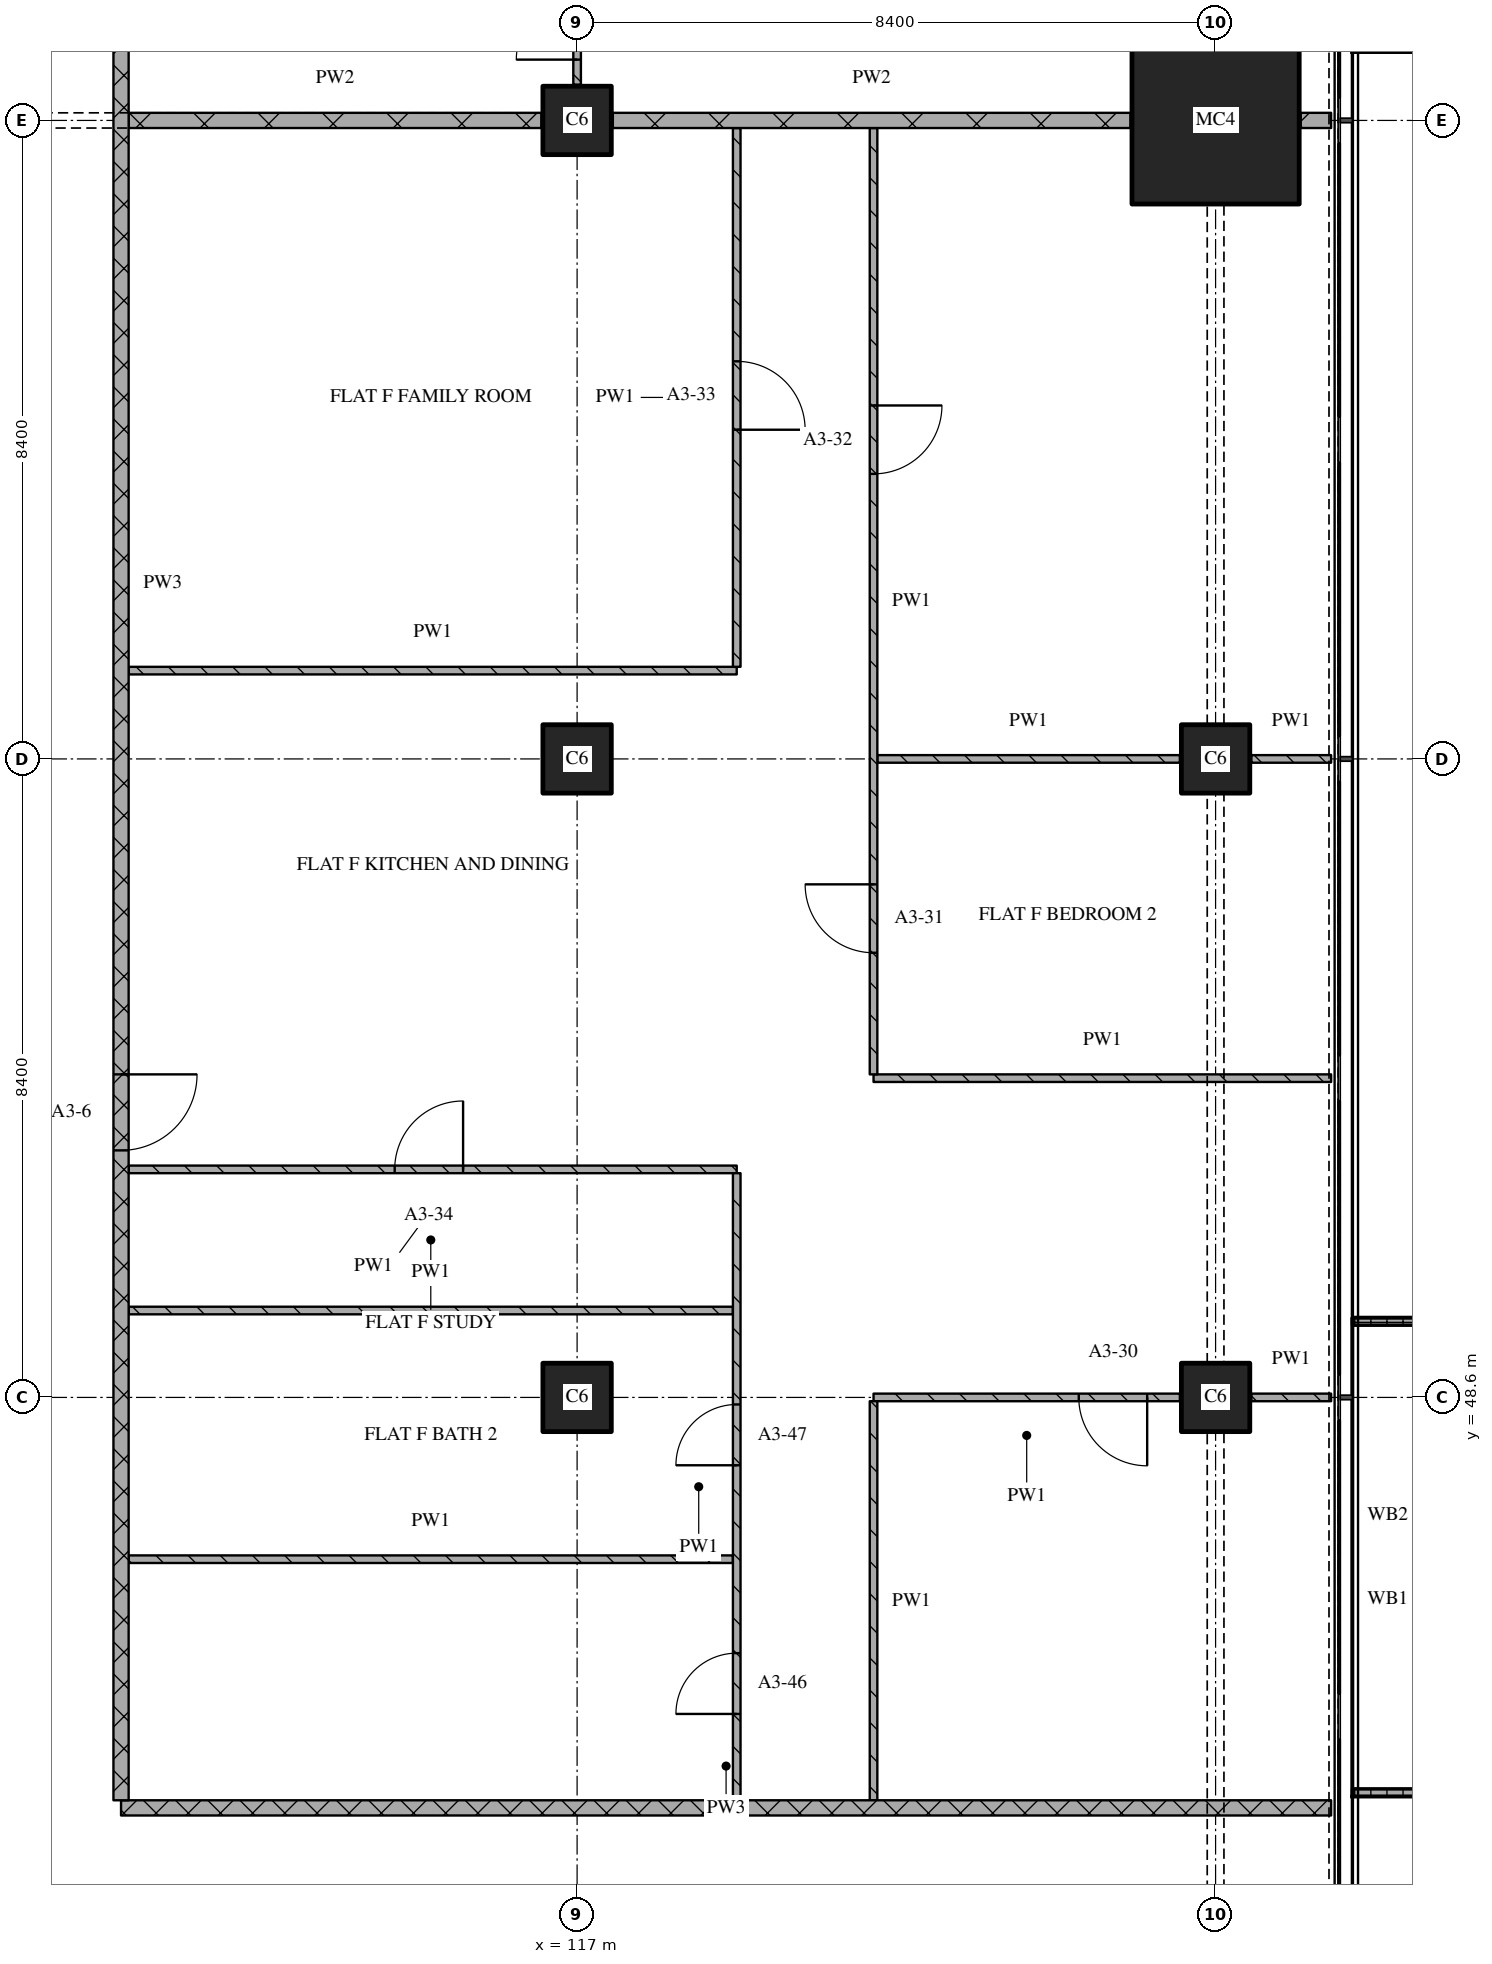
"""IFC4 building model, lengths in metres.
Left out: names, types, materials, properties, quantities, classifications, styles, units other than length and angle.
Written with IfcOpenShell. Run it as: python <this file> out.ifc"""

import sys

from ifc_helpers import new_model, si_unit, direction, frame, frame_2d, origin, origin_2d, place, context, subcontext, project, spatial, polyline, rectangle, outline, extrude, element, fill, save


model = new_model("IFC4")
c1 = context("Model", 3, precision=1e-05, world=origin(), true_north=direction((0.0, 1.0)))
c2 = subcontext(c1, "Body", "Model", "MODEL_VIEW")
j1 = project(units=[si_unit("LENGTHUNIT", "METRE"), si_unit("PLANEANGLEUNIT", "RADIAN")], contexts=[c1])
p1 = place(None, origin())
s1 = spatial("IfcSite", under=j1, at=p1, CompositionType="ELEMENT")
p2 = place(p1, origin())
s2 = spatial("IfcBuilding", under=s1, at=p2, CompositionType="ELEMENT")
p3 = place(p2, frame((0.0, 0.0, 66.0)))
s3 = spatial("IfcBuildingStorey", under=s2, at=p3, CompositionType="ELEMENT", Elevation=66.0)
for number, where, z_axis, x_axis in (
    (1, (117.0, 48.6, 0.0), (0.0, 0.0, 1.0), (1.0, 0.0, 0.0)),
    (2, (117.0, 57.0, 0.0), (0.0, 0.0, 1.0), (1.0, 0.0, 0.0)),
    (3, (117.0, 65.4, 0.0), (0.0, 0.0, 1.0), (1.0, 0.0, 0.0)),
    (4, (125.4, 48.6, 0.0), (0.0, 0.0, 1.0), (1.0, 0.0, 0.0)),
    (5, (125.4, 57.0, 0.0), (0.0, 0.0, 1.0), (1.0, 0.0, 0.0)),
):
    element("IfcColumn", number, at=place(p3, frame(where, z_axis=z_axis, x_axis=x_axis)), inside=s3, PredefinedType="COLUMN", context=c2, shape_type="SweptSolid", body=[
        extrude(rectangle(XDim=0.9, YDim=0.9, at=origin_2d()), origin(), (0.0, 0.0, 1.0), 3.6),
    ])
p4 = place(p3, frame((125.4, 65.4, 0.0), z_axis=(0.0, 0.0, 1.0), x_axis=(1.0, 0.0, 0.0)))
e6 = element("IfcColumn", 6, at=p4, inside=s3, PredefinedType="COLUMN", context=c2, shape_type="SweptSolid", body=[
    extrude(rectangle(XDim=2.2, YDim=2.2, at=origin_2d()), origin(), (0.0, 0.0, 1.0), 3.6),
])
p5 = place(p3, origin())
e7 = element("IfcWall", 7, at=p5, inside=s3, PredefinedType="SOLIDWALL", context=c2, shape_type="SweptSolid", body=[
    extrude(outline(polyline([(127.2, 43.35), (127.2, 43.45), (128.967, 43.45), (128.967, 49.55), (127.2, 49.55), (127.2, 49.65), (129.067, 49.65), (129.067, 43.35), (127.2, 43.35)])), origin(), (0.0, 0.0, 1.0), 1.0),
])
p6 = place(p3, frame((111.0, 43.2, 0.0), z_axis=(0.0, 0.0, 1.0), x_axis=(1.0, 0.0, 0.0)))
e8 = element("IfcWall", 8, at=p6, inside=s3, PredefinedType="PARTITIONING", context=c2, shape_type="SweptSolid", body=[
    extrude(rectangle(XDim=15.92, YDim=0.2, at=frame_2d((7.96, 0.0))), origin(), (0.0, 0.0, 1.0), 3.32),
])
p7 = place(p3, frame((111.1, 46.472, 0.0), z_axis=(0.0, 0.0, 1.0), x_axis=(1.0, 0.0, 0.0)))
e9 = element("IfcWall", 9, at=p7, inside=s3, PredefinedType="PARTITIONING", context=c2, shape_type="SweptSolid", body=[
    extrude(rectangle(XDim=7.95, YDim=0.1, at=frame_2d((3.975, 0.0))), origin(), (0.0, 0.0, 1.0), 3.32),
])
p8 = place(p3, frame((124.93, 48.6, 0.0), z_axis=(0.0, 0.0, 1.0), x_axis=(-1.0, 0.0, 0.0)))
e10 = element("IfcWall", 10, at=p8, inside=s3, PredefinedType="PARTITIONING", context=c2, shape_type="SweptSolid", body=[
    extrude(rectangle(XDim=4.03, YDim=0.1, at=frame_2d((2.015, 0.0))), origin(), (0.0, 0.0, 1.0), 3.32),
])
p9 = place(p8, frame((0.43, 0.0, 0.0)))
e11 = element("IfcOpeningElement", 11, at=p9, cuts=e10, PredefinedType="OPENING", context=c2, shape_type="SweptSolid", body=[
    extrude(rectangle(XDim=0.9, YDim=2.1, at=frame_2d((0.45, 1.05))), frame((0.0, 0.06, 0.0), z_axis=(0.0, -1.0, 0.0), x_axis=(1.0, 0.0, 0.0)), (0.0, 0.0, 1.0), 0.12),
])
p10 = place(p3, frame((125.87, 48.6, 0.0), z_axis=(0.0, 0.0, 1.0), x_axis=(1.0, 0.0, 0.0)))
e12 = element("IfcWall", 12, at=p10, inside=s3, PredefinedType="PARTITIONING", context=c2, shape_type="SweptSolid", body=[
    extrude(rectangle(XDim=1.05, YDim=0.1, at=frame_2d((0.525, 0.0))), origin(), (0.0, 0.0, 1.0), 3.32),
])
p11 = place(p3, frame((111.1, 49.743, 0.0), z_axis=(0.0, 0.0, 1.0), x_axis=(1.0, 0.0, 0.0)))
e13 = element("IfcWall", 13, at=p11, inside=s3, PredefinedType="PARTITIONING", context=c2, shape_type="SweptSolid", body=[
    extrude(rectangle(XDim=7.95, YDim=0.1, at=frame_2d((3.975, 0.0))), origin(), (0.0, 0.0, 1.0), 3.32),
])
p12 = place(p3, frame((119.1, 51.6, 0.0), z_axis=(0.0, 0.0, 1.0), x_axis=(-1.0, 0.0, 0.0)))
e14 = element("IfcWall", 14, at=p12, inside=s3, PredefinedType="PARTITIONING", context=c2, shape_type="SweptSolid", body=[
    extrude(rectangle(XDim=8.0, YDim=0.1, at=frame_2d((4.0, 0.0))), origin(), (0.0, 0.0, 1.0), 3.32),
])
p13 = place(p12, frame((3.6, 0.0, 0.0)))
e15 = element("IfcOpeningElement", 15, at=p13, cuts=e14, PredefinedType="OPENING", context=c2, shape_type="SweptSolid", body=[
    extrude(rectangle(XDim=0.9, YDim=2.1, at=frame_2d((0.45, 1.05))), frame((0.0, 0.06, 0.0), z_axis=(0.0, -1.0, 0.0), x_axis=(1.0, 0.0, 0.0)), (0.0, 0.0, 1.0), 0.12),
])
p14 = place(p3, frame((120.9, 52.8, 0.0), z_axis=(0.0, 0.0, 1.0), x_axis=(1.0, 0.0, 0.0)))
e16 = element("IfcWall", 16, at=p14, inside=s3, PredefinedType="PARTITIONING", context=c2, shape_type="SweptSolid", body=[
    extrude(rectangle(XDim=6.02, YDim=0.1, at=frame_2d((3.01, 0.0))), origin(), (0.0, 0.0, 1.0), 3.32),
])
p15 = place(p3, frame((120.95, 57.0, 0.0), z_axis=(0.0, 0.0, 1.0), x_axis=(1.0, 0.0, 0.0)))
e17 = element("IfcWall", 17, at=p15, inside=s3, PredefinedType="PARTITIONING", context=c2, shape_type="SweptSolid", body=[
    extrude(rectangle(XDim=3.98, YDim=0.1, at=frame_2d((1.99, 0.0))), origin(), (0.0, 0.0, 1.0), 3.32),
])
p16 = place(p3, frame((125.87, 57.0, 0.0), z_axis=(0.0, 0.0, 1.0), x_axis=(1.0, 0.0, 0.0)))
e18 = element("IfcWall", 18, at=p16, inside=s3, PredefinedType="PARTITIONING", context=c2, shape_type="SweptSolid", body=[
    extrude(rectangle(XDim=1.05, YDim=0.1, at=frame_2d((0.525, 0.0))), origin(), (0.0, 0.0, 1.0), 3.32),
])
p17 = place(p3, frame((111.1, 58.162, 0.0), z_axis=(0.0, 0.0, 1.0), x_axis=(1.0, 0.0, 0.0)))
e19 = element("IfcWall", 19, at=p17, inside=s3, PredefinedType="PARTITIONING", context=c2, shape_type="SweptSolid", body=[
    extrude(rectangle(XDim=8.0, YDim=0.1, at=frame_2d((4.0, 0.0))), origin(), (0.0, 0.0, 1.0), 3.32),
])
p18 = place(p3, frame((111.1, 65.4, 0.0), z_axis=(0.0, 0.0, 1.0), x_axis=(1.0, 0.0, 0.0)))
e20 = element("IfcWall", 20, at=p18, inside=s3, PredefinedType="PARTITIONING", context=c2, shape_type="SweptSolid", body=[
    extrude(rectangle(XDim=5.43, YDim=0.2, at=frame_2d((2.715, 0.0))), origin(), (0.0, 0.0, 1.0), 2.82),
])
p19 = place(p3, frame((117.47, 65.4, 0.0), z_axis=(0.0, 0.0, 1.0), x_axis=(1.0, 0.0, 0.0)))
e21 = element("IfcWall", 21, at=p19, inside=s3, PredefinedType="PARTITIONING", context=c2, shape_type="SweptSolid", body=[
    extrude(rectangle(XDim=6.81, YDim=0.2, at=frame_2d((3.405, 0.0))), origin(), (0.0, 0.0, 1.0), 3.32),
])
p20 = place(p3, frame((126.52, 65.4, 0.0), z_axis=(0.0, 0.0, 1.0), x_axis=(1.0, 0.0, 0.0)))
e22 = element("IfcWall", 22, at=p20, inside=s3, PredefinedType="PARTITIONING", context=c2, shape_type="SweptSolid", body=[
    extrude(rectangle(XDim=0.4, YDim=0.2, at=frame_2d((0.2, 0.0))), origin(), (0.0, 0.0, 1.0), 3.32),
])
p21 = place(p3, frame((111.0, 75.32, 0.0), z_axis=(0.0, 0.0, 1.0), x_axis=(0.0, -1.0, 0.0)))
e23 = element("IfcWall", 23, at=p21, inside=s3, PredefinedType="PARTITIONING", context=c2, shape_type="SweptSolid", body=[
    extrude(rectangle(XDim=32.02, YDim=0.2, at=frame_2d((16.01, 0.0))), origin(), (0.0, 0.0, 1.0), 3.32),
])
p22 = place(p21, frame((6.27, 0.0, 0.0)))
e24 = element("IfcOpeningElement", 24, at=p22, cuts=e23, PredefinedType="OPENING", context=c2, shape_type="SweptSolid", body=[
    extrude(rectangle(XDim=1.0, YDim=2.1, at=frame_2d((0.5, 1.05))), frame((0.0, 0.11, 0.0), z_axis=(0.0, -1.0, 0.0), x_axis=(1.0, 0.0, 0.0)), (0.0, 0.0, 1.0), 0.22),
])
p23 = place(p21, frame((22.47, 0.0, 0.0)))
e25 = element("IfcOpeningElement", 25, at=p23, cuts=e23, PredefinedType="OPENING", context=c2, shape_type="SweptSolid", body=[
    extrude(rectangle(XDim=1.0, YDim=2.1, at=frame_2d((0.5, 1.05))), frame((0.0, 0.11, 0.0), z_axis=(0.0, -1.0, 0.0), x_axis=(1.0, 0.0, 0.0)), (0.0, 0.0, 1.0), 0.22),
])
p24 = place(p3, frame((117.0, 65.87, 0.0), z_axis=(0.0, 0.0, 1.0), x_axis=(0.0, 1.0, 0.0)))
e26 = element("IfcWall", 26, at=p24, inside=s3, PredefinedType="PARTITIONING", context=c2, shape_type="SweptSolid", body=[
    extrude(rectangle(XDim=1.88, YDim=0.1, at=frame_2d((0.94, 0.0))), origin(), (0.0, 0.0, 1.0), 3.32),
])
p25 = place(p24, frame((0.33, 0.0, 0.0)))
e27 = element("IfcOpeningElement", 27, at=p25, cuts=e26, PredefinedType="OPENING", context=c2, shape_type="SweptSolid", body=[
    extrude(rectangle(XDim=0.8, YDim=2.1, at=frame_2d((0.4, 1.05))), frame((0.0, 0.06, 0.0), z_axis=(0.0, -1.0, 0.0), x_axis=(1.0, 0.0, 0.0)), (0.0, 0.0, 1.0), 0.12),
])
p26 = place(p3, frame((119.1, 43.3, 0.0), z_axis=(0.0, 0.0, 1.0), x_axis=(0.0, 1.0, 0.0)))
e28 = element("IfcWall", 28, at=p26, inside=s3, PredefinedType="PARTITIONING", context=c2, shape_type="SweptSolid", body=[
    extrude(rectangle(XDim=8.25, YDim=0.1, at=frame_2d((4.125, 0.0))), origin(), (0.0, 0.0, 1.0), 3.32),
])
p27 = place(p26, frame((1.136, 0.0, 0.0)))
e29 = element("IfcOpeningElement", 29, at=p27, cuts=e28, PredefinedType="OPENING", context=c2, shape_type="SweptSolid", body=[
    extrude(rectangle(XDim=0.8, YDim=2.1, at=frame_2d((0.4, 1.05))), frame((0.0, 0.06, 0.0), z_axis=(0.0, -1.0, 0.0), x_axis=(1.0, 0.0, 0.0)), (0.0, 0.0, 1.0), 0.12),
])
p28 = place(p26, frame((4.407, 0.0, 0.0)))
e30 = element("IfcOpeningElement", 30, at=p28, cuts=e28, PredefinedType="OPENING", context=c2, shape_type="SweptSolid", body=[
    extrude(rectangle(XDim=0.8, YDim=2.1, at=frame_2d((0.4, 1.05))), frame((0.0, 0.06, 0.0), z_axis=(0.0, -1.0, 0.0), x_axis=(1.0, 0.0, 0.0)), (0.0, 0.0, 1.0), 0.12),
])
p29 = place(p3, frame((119.1, 58.212, 0.0), z_axis=(0.0, 0.0, 1.0), x_axis=(0.0, 1.0, 0.0)))
e31 = element("IfcWall", 31, at=p29, inside=s3, PredefinedType="PARTITIONING", context=c2, shape_type="SweptSolid", body=[
    extrude(rectangle(XDim=7.088, YDim=0.1, at=frame_2d((3.544, 0.0))), origin(), (0.0, 0.0, 1.0), 3.32),
])
p30 = place(p29, frame((3.119, 0.0, 0.0)))
e32 = element("IfcOpeningElement", 32, at=p30, cuts=e31, PredefinedType="OPENING", context=c2, shape_type="SweptSolid", body=[
    extrude(rectangle(XDim=0.9, YDim=2.1, at=frame_2d((0.45, 1.05))), frame((0.0, 0.06, 0.0), z_axis=(0.0, -1.0, 0.0), x_axis=(1.0, 0.0, 0.0)), (0.0, 0.0, 1.0), 0.12),
])
p31 = place(p3, frame((120.9, 48.55, 0.0), z_axis=(0.0, 0.0, 1.0), x_axis=(0.0, -1.0, 0.0)))
e33 = element("IfcWall", 33, at=p31, inside=s3, PredefinedType="PARTITIONING", context=c2, shape_type="SweptSolid", body=[
    extrude(rectangle(XDim=5.25, YDim=0.1, at=frame_2d((2.625, 0.0))), origin(), (0.0, 0.0, 1.0), 3.32),
])
p32 = place(p3, frame((120.9, 65.3, 0.0), z_axis=(0.0, 0.0, 1.0), x_axis=(0.0, -1.0, 0.0)))
e34 = element("IfcWall", 34, at=p32, inside=s3, PredefinedType="PARTITIONING", context=c2, shape_type="SweptSolid", body=[
    extrude(rectangle(XDim=12.45, YDim=0.1, at=frame_2d((6.225, 0.0))), origin(), (0.0, 0.0, 1.0), 3.32),
])
p33 = place(p32, frame((3.65, 0.0, 0.0)))
e35 = element("IfcOpeningElement", 35, at=p33, cuts=e34, PredefinedType="OPENING", context=c2, shape_type="SweptSolid", body=[
    extrude(rectangle(XDim=0.9, YDim=2.1, at=frame_2d((0.45, 1.05))), frame((0.0, 0.06, 0.0), z_axis=(0.0, -1.0, 0.0), x_axis=(1.0, 0.0, 0.0)), (0.0, 0.0, 1.0), 0.12),
])
p34 = place(p32, frame((9.95, 0.0, 0.0)))
e36 = element("IfcOpeningElement", 36, at=p34, cuts=e34, PredefinedType="OPENING", context=c2, shape_type="SweptSolid", body=[
    extrude(rectangle(XDim=0.9, YDim=2.1, at=frame_2d((0.45, 1.05))), frame((0.0, 0.06, 0.0), z_axis=(0.0, -1.0, 0.0), x_axis=(1.0, 0.0, 0.0)), (0.0, 0.0, 1.0), 0.12),
])
p35 = place(p9, origin())
e37 = element("IfcDoor", 37, at=p35, inside=s3, OperationType="SINGLE_SWING_LEFT", PredefinedType="DOOR", context=c2, shape_type="SweptSolid", body=[
    extrude(rectangle(XDim=0.9, YDim=2.1, at=frame_2d((0.45, 1.05))), frame((0.0, 0.025, 0.0), z_axis=(0.0, -1.0, 0.0), x_axis=(1.0, 0.0, 0.0)), (0.0, 0.0, 1.0), 0.05),
])
fill(e11, e37)
p36 = place(p13, origin())
e38 = element("IfcDoor", 38, at=p36, inside=s3, OperationType="SINGLE_SWING_RIGHT", PredefinedType="DOOR", context=c2, shape_type="SweptSolid", body=[
    extrude(rectangle(XDim=0.9, YDim=2.1, at=frame_2d((0.45, 1.05))), frame((0.0, 0.025, 0.0), z_axis=(0.0, -1.0, 0.0), x_axis=(1.0, 0.0, 0.0)), (0.0, 0.0, 1.0), 0.05),
])
fill(e15, e38)
p37 = place(p23, origin())
e39 = element("IfcDoor", 39, at=p37, inside=s3, OperationType="SINGLE_SWING_LEFT", PredefinedType="DOOR", context=c2, shape_type="SweptSolid", body=[
    extrude(rectangle(XDim=1.0, YDim=2.1, at=frame_2d((0.5, 1.05))), frame((0.0, 0.025, 0.0), z_axis=(0.0, -1.0, 0.0), x_axis=(1.0, 0.0, 0.0)), (0.0, 0.0, 1.0), 0.05),
])
fill(e25, e39)
p38 = place(p25, origin())
e40 = element("IfcDoor", 40, at=p38, inside=s3, OperationType="SINGLE_SWING_LEFT", PredefinedType="DOOR", context=c2, shape_type="SweptSolid", body=[
    extrude(rectangle(XDim=0.8, YDim=2.1, at=frame_2d((0.4, 1.05))), frame((0.0, 0.025, 0.0), z_axis=(0.0, -1.0, 0.0), x_axis=(1.0, 0.0, 0.0)), (0.0, 0.0, 1.0), 0.05),
])
fill(e27, e40)
p39 = place(p27, origin())
e41 = element("IfcDoor", 41, at=p39, inside=s3, OperationType="SINGLE_SWING_LEFT", PredefinedType="DOOR", context=c2, shape_type="SweptSolid", body=[
    extrude(rectangle(XDim=0.8, YDim=2.1, at=frame_2d((0.4, 1.05))), frame((0.0, 0.025, 0.0), z_axis=(0.0, -1.0, 0.0), x_axis=(1.0, 0.0, 0.0)), (0.0, 0.0, 1.0), 0.05),
])
fill(e29, e41)
p40 = place(p28, origin())
e42 = element("IfcDoor", 42, at=p40, inside=s3, OperationType="SINGLE_SWING_LEFT", PredefinedType="DOOR", context=c2, shape_type="SweptSolid", body=[
    extrude(rectangle(XDim=0.8, YDim=2.1, at=frame_2d((0.4, 1.05))), frame((0.0, 0.025, 0.0), z_axis=(0.0, -1.0, 0.0), x_axis=(1.0, 0.0, 0.0)), (0.0, 0.0, 1.0), 0.05),
])
fill(e30, e42)
p41 = place(p30, origin())
e43 = element("IfcDoor", 43, at=p41, inside=s3, OperationType="SINGLE_SWING_RIGHT", PredefinedType="DOOR", context=c2, shape_type="SweptSolid", body=[
    extrude(rectangle(XDim=0.9, YDim=2.1, at=frame_2d((0.45, 1.05))), frame((0.0, 0.025, 0.0), z_axis=(0.0, -1.0, 0.0), x_axis=(1.0, 0.0, 0.0)), (0.0, 0.0, 1.0), 0.05),
])
fill(e32, e43)
p42 = place(p33, origin())
e44 = element("IfcDoor", 44, at=p42, inside=s3, OperationType="SINGLE_SWING_LEFT", PredefinedType="DOOR", context=c2, shape_type="SweptSolid", body=[
    extrude(rectangle(XDim=0.9, YDim=2.1, at=frame_2d((0.45, 1.05))), frame((0.0, 0.025, 0.0), z_axis=(0.0, -1.0, 0.0), x_axis=(1.0, 0.0, 0.0)), (0.0, 0.0, 1.0), 0.05),
])
fill(e35, e44)
p43 = place(p34, origin())
e45 = element("IfcDoor", 45, at=p43, inside=s3, OperationType="SINGLE_SWING_RIGHT", PredefinedType="DOOR", context=c2, shape_type="SweptSolid", body=[
    extrude(rectangle(XDim=0.9, YDim=2.1, at=frame_2d((0.45, 1.05))), frame((0.0, 0.025, 0.0), z_axis=(0.0, -1.0, 0.0), x_axis=(1.0, 0.0, 0.0)), (0.0, 0.0, 1.0), 0.05),
])
fill(e36, e45)
save(model, sys.argv[1])
